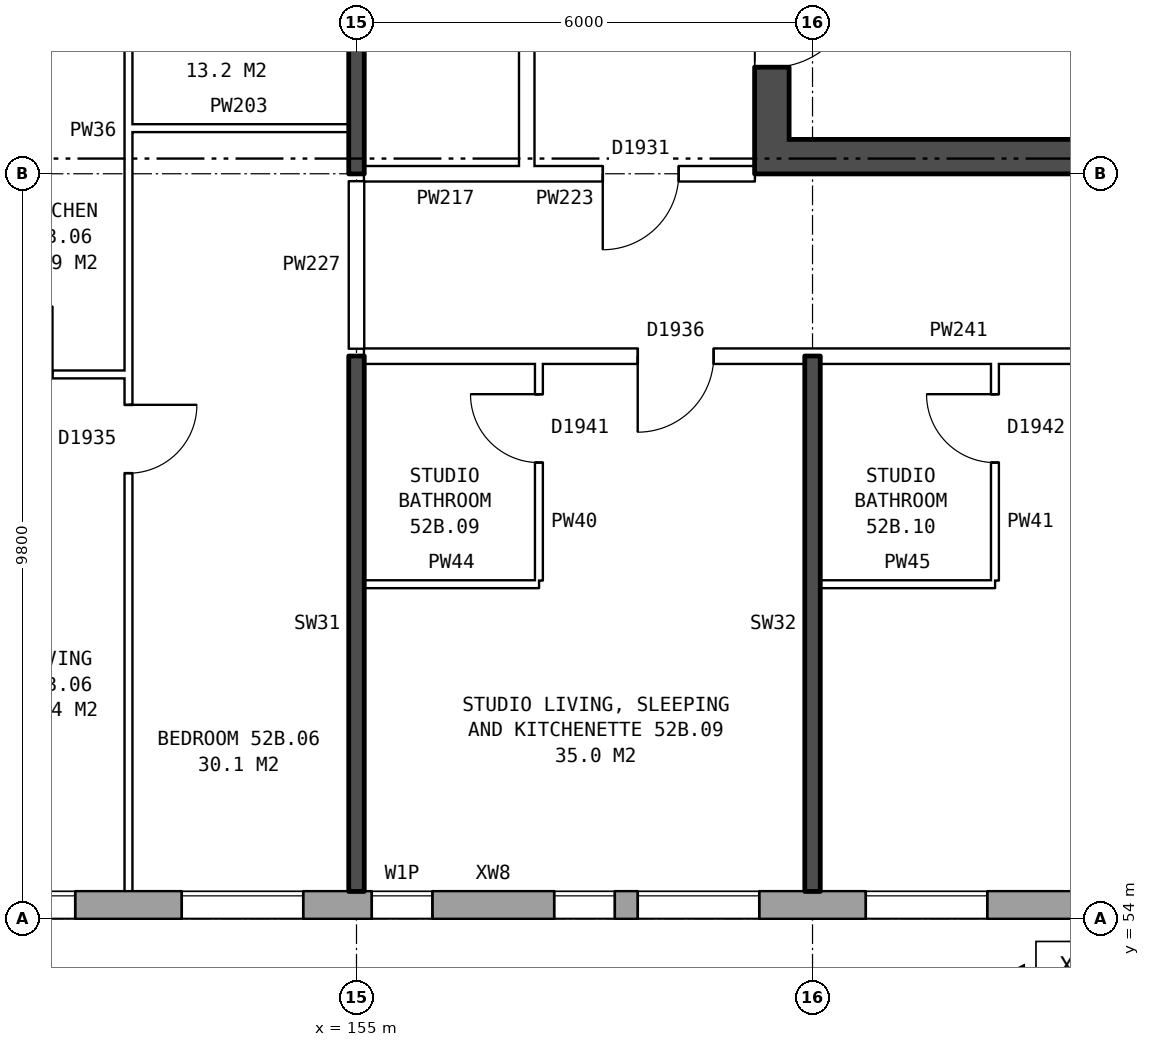
"""IFC4 building model, lengths in metres.
Left out: names, types, materials, properties, quantities, classifications, styles, units other than length and angle.
Written with IfcOpenShell. Run it as: python <this file> out.ifc"""

import sys

from ifc_helpers import new_model, si_unit, direction, frame, frame_2d, origin, place, context, subcontext, project, spatial, rectangle, extrude, element, fill, save


model = new_model("IFC4")
c1 = context("Model", 3, precision=1e-05, world=origin(), true_north=direction((0.0, 1.0)))
c2 = subcontext(c1, "Body", "Model", "MODEL_VIEW")
j1 = project(units=[si_unit("LENGTHUNIT", "METRE"), si_unit("PLANEANGLEUNIT", "RADIAN")], contexts=[c1])
p1 = place(None, origin())
s1 = spatial("IfcSite", under=j1, at=p1, CompositionType="ELEMENT")
p2 = place(p1, origin())
s2 = spatial("IfcBuilding", under=s1, at=p2, CompositionType="ELEMENT")
p3 = place(p2, frame((0.0, 0.0, 185.1)))
s3 = spatial("IfcBuildingStorey", under=s2, at=p3, CompositionType="ELEMENT", Elevation=185.1)
p4 = place(p3, frame((134.075, 54.18, 0.0), z_axis=(0.0, 0.0, 1.0), x_axis=(1.0, 0.0, 0.0)))
e1 = element("IfcWall", 1, at=p4, inside=s3, PredefinedType="STANDARD", context=c2, shape_type="SweptSolid", body=[
    extrude(rectangle(XDim=33.101, YDim=0.36, at=frame_2d((16.55, 0.0))), origin(), (0.0, 0.0, 1.0), 2.85),
])
p5 = place(p4, frame((0.625, 0.0, 0.8)))
e2 = element("IfcOpeningElement", 2, at=p5, cuts=e1, PredefinedType="OPENING", context=c2, shape_type="SweptSolid", body=[
    extrude(rectangle(XDim=1.6, YDim=1.8, at=frame_2d((0.8, 0.9))), frame((0.0, 0.19, 0.0), z_axis=(0.0, -1.0, 0.0), x_axis=(1.0, 0.0, 0.0)), (0.0, 0.0, 1.0), 0.38),
])
p6 = place(p4, frame((3.625, 0.0, 0.8)))
e3 = element("IfcOpeningElement", 3, at=p6, cuts=e1, PredefinedType="OPENING", context=c2, shape_type="SweptSolid", body=[
    extrude(rectangle(XDim=1.6, YDim=1.8, at=frame_2d((0.8, 0.9))), frame((0.0, 0.19, 0.0), z_axis=(0.0, -1.0, 0.0), x_axis=(1.0, 0.0, 0.0)), (0.0, 0.0, 1.0), 0.38),
])
p7 = place(p4, frame((6.625, 0.0, 0.8)))
e4 = element("IfcOpeningElement", 4, at=p7, cuts=e1, PredefinedType="OPENING", context=c2, shape_type="SweptSolid", body=[
    extrude(rectangle(XDim=1.6, YDim=1.8, at=frame_2d((0.8, 0.9))), frame((0.0, 0.19, 0.0), z_axis=(0.0, -1.0, 0.0), x_axis=(1.0, 0.0, 0.0)), (0.0, 0.0, 1.0), 0.38),
])
p8 = place(p4, frame((9.125, 0.0, 1.65)))
e5 = element("IfcOpeningElement", 5, at=p8, cuts=e1, PredefinedType="OPENING", context=c2, shape_type="SweptSolid", body=[
    extrude(rectangle(XDim=0.6, YDim=0.9, at=frame_2d((0.3, 0.45))), frame((0.0, 0.19, 0.0), z_axis=(0.0, -1.0, 0.0), x_axis=(1.0, 0.0, 0.0)), (0.0, 0.0, 1.0), 0.38),
])
p9 = place(p4, frame((12.625, 0.0, 0.8)))
e6 = element("IfcOpeningElement", 6, at=p9, cuts=e1, PredefinedType="OPENING", context=c2, shape_type="SweptSolid", body=[
    extrude(rectangle(XDim=1.6, YDim=1.8, at=frame_2d((0.8, 0.9))), frame((0.0, 0.19, 0.0), z_axis=(0.0, -1.0, 0.0), x_axis=(1.0, 0.0, 0.0)), (0.0, 0.0, 1.0), 0.38),
])
p10 = place(p4, frame((15.625, 0.0, 0.8)))
e7 = element("IfcOpeningElement", 7, at=p10, cuts=e1, PredefinedType="OPENING", context=c2, shape_type="SweptSolid", body=[
    extrude(rectangle(XDim=1.6, YDim=1.8, at=frame_2d((0.8, 0.9))), frame((0.0, 0.19, 0.0), z_axis=(0.0, -1.0, 0.0), x_axis=(1.0, 0.0, 0.0)), (0.0, 0.0, 1.0), 0.38),
])
p11 = place(p4, frame((18.625, 0.0, 0.8)))
e8 = element("IfcOpeningElement", 8, at=p11, cuts=e1, PredefinedType="OPENING", context=c2, shape_type="SweptSolid", body=[
    extrude(rectangle(XDim=1.6, YDim=1.8, at=frame_2d((0.8, 0.9))), frame((0.0, 0.19, 0.0), z_axis=(0.0, -1.0, 0.0), x_axis=(1.0, 0.0, 0.0)), (0.0, 0.0, 1.0), 0.38),
])
p12 = place(p4, frame((21.125, 0.0, 0.8)))
e9 = element("IfcOpeningElement", 9, at=p12, cuts=e1, PredefinedType="OPENING", context=c2, shape_type="SweptSolid", body=[
    extrude(rectangle(XDim=0.8, YDim=1.2, at=frame_2d((0.4, 0.6))), frame((0.0, 0.19, 0.0), z_axis=(0.0, -1.0, 0.0), x_axis=(1.0, 0.0, 0.0)), (0.0, 0.0, 1.0), 0.38),
])
p13 = place(p4, frame((24.625, 0.0, 0.8)))
e10 = element("IfcOpeningElement", 10, at=p13, cuts=e1, PredefinedType="OPENING", context=c2, shape_type="SweptSolid", body=[
    extrude(rectangle(XDim=1.6, YDim=1.8, at=frame_2d((0.8, 0.9))), frame((0.0, 0.19, 0.0), z_axis=(0.0, -1.0, 0.0), x_axis=(1.0, 0.0, 0.0)), (0.0, 0.0, 1.0), 0.38),
])
p14 = place(p4, frame((27.625, 0.0, 0.8)))
e11 = element("IfcOpeningElement", 11, at=p14, cuts=e1, PredefinedType="OPENING", context=c2, shape_type="SweptSolid", body=[
    extrude(rectangle(XDim=1.6, YDim=1.8, at=frame_2d((0.8, 0.9))), frame((0.0, 0.19, 0.0), z_axis=(0.0, -1.0, 0.0), x_axis=(1.0, 0.0, 0.0)), (0.0, 0.0, 1.0), 0.38),
])
p15 = place(p4, frame((30.625, 0.0, 0.8)))
e12 = element("IfcOpeningElement", 12, at=p15, cuts=e1, PredefinedType="OPENING", context=c2, shape_type="SweptSolid", body=[
    extrude(rectangle(XDim=1.6, YDim=1.8, at=frame_2d((0.8, 0.9))), frame((0.0, 0.19, 0.0), z_axis=(0.0, -1.0, 0.0), x_axis=(1.0, 0.0, 0.0)), (0.0, 0.0, 1.0), 0.38),
])
p16 = place(p4, frame((10.725, 0.0, 0.35)))
e13 = element("IfcOpeningElement", 13, at=p16, cuts=e1, PredefinedType="OPENING", context=c2, shape_type="SweptSolid", body=[
    extrude(rectangle(XDim=1.0, YDim=1.2, at=frame_2d((0.5, 0.6))), frame((0.0, 0.19, 0.0), z_axis=(0.0, -1.0, 0.0), x_axis=(1.0, 0.0, 0.0)), (0.0, 0.0, 1.0), 0.38),
])
p17 = place(p4, frame((23.525, 0.0, 1.4)))
e14 = element("IfcOpeningElement", 14, at=p17, cuts=e1, PredefinedType="OPENING", context=c2, shape_type="SweptSolid", body=[
    extrude(rectangle(XDim=0.8, YDim=1.2, at=frame_2d((0.4, 0.6))), frame((0.0, 0.19, 0.0), z_axis=(0.0, -1.0, 0.0), x_axis=(1.0, 0.0, 0.0)), (0.0, 0.0, 1.0), 0.38),
])
p18 = place(p3, frame((160.465, 76.2, 0.0), z_axis=(0.0, 0.0, 1.0), x_axis=(0.0, -1.0, 0.0)))
e15 = element("IfcWall", 15, at=p18, inside=s3, PredefinedType="SHEAR", context=c2, shape_type="SweptSolid", body=[
    extrude(rectangle(XDim=12.4, YDim=0.45, at=frame_2d((6.2, 0.0))), origin(), (0.0, 0.0, 1.0), 2.85),
])
p19 = place(p18, frame((1.325, 0.0, 0.0)))
e16 = element("IfcOpeningElement", 16, at=p19, cuts=e15, PredefinedType="OPENING", context=c2, shape_type="SweptSolid", body=[
    extrude(rectangle(XDim=1.1, YDim=2.1, at=frame_2d((0.55, 1.05))), frame((0.0, 0.235, 0.0), z_axis=(0.0, -1.0, 0.0), x_axis=(1.0, 0.0, 0.0)), (0.0, 0.0, 1.0), 0.47),
])
p20 = place(p18, frame((3.825, 0.0, 0.0)))
e17 = element("IfcOpeningElement", 17, at=p20, cuts=e15, PredefinedType="OPENING", context=c2, shape_type="SweptSolid", body=[
    extrude(rectangle(XDim=0.85, YDim=2.1, at=frame_2d((0.425, 1.05))), frame((0.0, 0.235, 0.0), z_axis=(0.0, -1.0, 0.0), x_axis=(1.0, 0.0, 0.0)), (0.0, 0.0, 1.0), 0.47),
])
p21 = place(p18, frame((5.975, 0.0, 0.0)))
e18 = element("IfcOpeningElement", 18, at=p21, cuts=e15, PredefinedType="OPENING", context=c2, shape_type="SweptSolid", body=[
    extrude(rectangle(XDim=0.85, YDim=2.1, at=frame_2d((0.425, 1.05))), frame((0.0, 0.235, 0.0), z_axis=(0.0, -1.0, 0.0), x_axis=(1.0, 0.0, 0.0)), (0.0, 0.0, 1.0), 0.47),
])
p22 = place(p18, frame((9.9, 0.0, 0.0)))
e19 = element("IfcOpeningElement", 19, at=p22, cuts=e15, PredefinedType="OPENING", context=c2, shape_type="SweptSolid", body=[
    extrude(rectangle(XDim=1.1, YDim=2.1, at=frame_2d((0.55, 1.05))), frame((0.0, 0.235, 0.0), z_axis=(0.0, -1.0, 0.0), x_axis=(1.0, 0.0, 0.0)), (0.0, 0.0, 1.0), 0.47),
])
p23 = place(p18, frame((8.125, 0.0, 0.0)))
e20 = element("IfcOpeningElement", 20, at=p23, cuts=e15, PredefinedType="OPENING", context=c2, shape_type="SweptSolid", body=[
    extrude(rectangle(XDim=0.85, YDim=2.1, at=frame_2d((0.425, 1.05))), frame((0.0, 0.235, 0.0), z_axis=(0.0, -1.0, 0.0), x_axis=(1.0, 0.0, 0.0)), (0.0, 0.0, 1.0), 0.47),
])
p24 = place(p3, frame((160.69, 64.025, 0.0), z_axis=(0.0, 0.0, 1.0), x_axis=(1.0, 0.0, 0.0)))
e21 = element("IfcWall", 21, at=p24, inside=s3, PredefinedType="SHEAR", context=c2, shape_type="SweptSolid", body=[
    extrude(rectangle(XDim=7.5, YDim=0.45, at=frame_2d((3.75, 0.0))), origin(), (0.0, 0.0, 1.0), 2.85),
])
p25 = place(p3, frame((157.24, 63.9, 0.0), z_axis=(0.0, 0.0, 1.0), x_axis=(0.0, 1.0, 0.0)))
e22 = element("IfcWall", 22, at=p25, inside=s3, PredefinedType="PARTITIONING", context=c2, shape_type="SweptSolid", body=[
    extrude(rectangle(XDim=12.2, YDim=0.2, at=frame_2d((6.1, 0.0))), origin(), (0.0, 0.0, 1.0), 2.85),
])
p26 = place(p25, frame((5.1, 0.0, 0.0)))
e23 = element("IfcOpeningElement", 23, at=p26, cuts=e22, PredefinedType="OPENING", context=c2, shape_type="SweptSolid", body=[
    extrude(rectangle(XDim=2.0, YDim=2.1, at=frame_2d((1.0, 1.05))), frame((0.0, 0.11, 0.0), z_axis=(0.0, -1.0, 0.0), x_axis=(1.0, 0.0, 0.0)), (0.0, 0.0, 1.0), 0.22),
])
for number, where, z_axis, x_axis in (
    (24, (155.1, 58.4, 0.0), (0.0, 0.0, 1.0), (1.0, 0.0, 0.0)),
    (25, (161.1, 58.4, 0.0), (0.0, 0.0, 1.0), (1.0, 0.0, 0.0)),
):
    element("IfcWall", number, at=place(p3, frame(where, z_axis=z_axis, x_axis=x_axis)), inside=s3, PredefinedType="PARTITIONING", context=c2, shape_type="SweptSolid", body=[
        extrude(rectangle(XDim=2.3, YDim=0.1, at=frame_2d((1.15, 0.0))), origin(), (0.0, 0.0, 1.0), 2.85),
    ])
p27 = place(p3, frame((149.1, 61.16, 0.0), z_axis=(0.0, 0.0, 1.0), x_axis=(1.0, 0.0, 0.0)))
e26 = element("IfcWall", 26, at=p27, inside=s3, PredefinedType="PARTITIONING", context=c2, shape_type="SweptSolid", body=[
    extrude(rectangle(XDim=2.9, YDim=0.1, at=frame_2d((1.45, 0.0))), origin(), (0.0, 0.0, 1.0), 2.85),
])
p28 = place(p27, frame((1.0, 0.0, 0.0)))
e27 = element("IfcOpeningElement", 27, at=p28, cuts=e26, PredefinedType="OPENING", context=c2, shape_type="SweptSolid", body=[
    extrude(rectangle(XDim=0.9, YDim=2.1, at=frame_2d((0.45, 1.05))), frame((0.0, 0.06, 0.0), z_axis=(0.0, -1.0, 0.0), x_axis=(1.0, 0.0, 0.0)), (0.0, 0.0, 1.0), 0.12),
])
p29 = place(p3, frame((155.1, 61.4, 0.0), z_axis=(0.0, 0.0, 1.0), x_axis=(1.0, 0.0, 0.0)))
e28 = element("IfcWall", 28, at=p29, inside=s3, PredefinedType="PARTITIONING", context=c2, shape_type="SweptSolid", body=[
    extrude(rectangle(XDim=14.79, YDim=0.2, at=frame_2d((7.395, 0.0))), origin(), (0.0, 0.0, 1.0), 2.85),
])
p30 = place(p29, frame((3.6, 0.0, 0.0)))
e29 = element("IfcOpeningElement", 29, at=p30, cuts=e28, PredefinedType="OPENING", context=c2, shape_type="SweptSolid", body=[
    extrude(rectangle(XDim=1.0, YDim=2.1, at=frame_2d((0.5, 1.05))), frame((0.0, 0.11, 0.0), z_axis=(0.0, -1.0, 0.0), x_axis=(1.0, 0.0, 0.0)), (0.0, 0.0, 1.0), 0.22),
])
p31 = place(p29, frame((11.045, 0.0, 0.0)))
e30 = element("IfcOpeningElement", 30, at=p31, cuts=e28, PredefinedType="OPENING", context=c2, shape_type="SweptSolid", body=[
    extrude(rectangle(XDim=1.0, YDim=2.1, at=frame_2d((0.5, 1.05))), frame((0.0, 0.11, 0.0), z_axis=(0.0, -1.0, 0.0), x_axis=(1.0, 0.0, 0.0)), (0.0, 0.0, 1.0), 0.22),
])
p32 = place(p3, frame((155.1, 63.8, 0.0), z_axis=(0.0, 0.0, 1.0), x_axis=(1.0, 0.0, 0.0)))
e31 = element("IfcWall", 31, at=p32, inside=s3, PredefinedType="PARTITIONING", context=c2, shape_type="SweptSolid", body=[
    extrude(rectangle(XDim=2.14, YDim=0.2, at=frame_2d((1.07, 0.0))), origin(), (0.0, 0.0, 1.0), 2.85),
])
p33 = place(p3, frame((157.24, 63.8, 0.0), z_axis=(0.0, 0.0, 1.0), x_axis=(1.0, 0.0, 0.0)))
e32 = element("IfcWall", 32, at=p33, inside=s3, PredefinedType="PARTITIONING", context=c2, shape_type="SweptSolid", body=[
    extrude(rectangle(XDim=3.0, YDim=0.2, at=frame_2d((1.5, 0.0))), origin(), (0.0, 0.0, 1.0), 2.85),
])
p34 = place(p33, frame((1.0, 0.0, 0.0)))
e33 = element("IfcOpeningElement", 33, at=p34, cuts=e32, PredefinedType="OPENING", context=c2, shape_type="SweptSolid", body=[
    extrude(rectangle(XDim=1.0, YDim=2.1, at=frame_2d((0.5, 1.05))), frame((0.0, 0.11, 0.0), z_axis=(0.0, -1.0, 0.0), x_axis=(1.0, 0.0, 0.0)), (0.0, 0.0, 1.0), 0.22),
])
p35 = place(p3, frame((152.0, 64.4, 0.0), z_axis=(0.0, 0.0, 1.0), x_axis=(1.0, 0.0, 0.0)))
e34 = element("IfcWall", 34, at=p35, inside=s3, PredefinedType="PARTITIONING", context=c2, shape_type="SweptSolid", body=[
    extrude(rectangle(XDim=2.9, YDim=0.1, at=frame_2d((1.45, 0.0))), origin(), (0.0, 0.0, 1.0), 2.85),
])
p36 = place(p3, frame((152.0, 54.36, 0.0), z_axis=(0.0, 0.0, 1.0), x_axis=(0.0, 1.0, 0.0)))
e35 = element("IfcWall", 35, at=p36, inside=s3, PredefinedType="PARTITIONING", context=c2, shape_type="SweptSolid", body=[
    extrude(rectangle(XDim=14.34, YDim=0.1, at=frame_2d((7.17, 0.0))), origin(), (0.0, 0.0, 1.0), 2.85),
])
p37 = place(p36, frame((5.5, 0.0, 0.0)))
e36 = element("IfcOpeningElement", 36, at=p37, cuts=e35, PredefinedType="OPENING", context=c2, shape_type="SweptSolid", body=[
    extrude(rectangle(XDim=0.9, YDim=2.1, at=frame_2d((0.45, 1.05))), frame((0.0, 0.06, 0.0), z_axis=(0.0, -1.0, 0.0), x_axis=(1.0, 0.0, 0.0)), (0.0, 0.0, 1.0), 0.12),
])
p38 = place(p36, frame((13.04, 0.0, 0.0)))
e37 = element("IfcOpeningElement", 37, at=p38, cuts=e35, PredefinedType="OPENING", context=c2, shape_type="SweptSolid", body=[
    extrude(rectangle(XDim=0.9, YDim=2.1, at=frame_2d((0.45, 1.05))), frame((0.0, 0.06, 0.0), z_axis=(0.0, -1.0, 0.0), x_axis=(1.0, 0.0, 0.0)), (0.0, 0.0, 1.0), 0.12),
])
p39 = place(p3, frame((155.0, 54.36, 0.0), z_axis=(0.0, 0.0, 1.0), x_axis=(0.0, 1.0, 0.0)))
e38 = element("IfcWall", 38, at=p39, inside=s3, PredefinedType="SOLIDWALL", context=c2, shape_type="SweptSolid", body=[
    extrude(rectangle(XDim=7.04, YDim=0.2, at=frame_2d((3.52, 0.0))), origin(), (0.0, 0.0, 1.0), 2.85),
])
p40 = place(p3, frame((155.0, 61.5, 0.0), z_axis=(0.0, 0.0, 1.0), x_axis=(0.0, 1.0, 0.0)))
e39 = element("IfcWall", 39, at=p40, inside=s3, PredefinedType="PARTITIONING", context=c2, shape_type="SweptSolid", body=[
    extrude(rectangle(XDim=2.2, YDim=0.2, at=frame_2d((1.1, 0.0))), origin(), (0.0, 0.0, 1.0), 2.85),
])
p41 = place(p3, frame((155.0, 63.8, 0.0), z_axis=(0.0, 0.0, 1.0), x_axis=(0.0, 1.0, 0.0)))
e40 = element("IfcWall", 40, at=p41, inside=s3, PredefinedType="SOLIDWALL", context=c2, shape_type="SweptSolid", body=[
    extrude(rectangle(XDim=5.0, YDim=0.2, at=frame_2d((2.5, 0.0))), origin(), (0.0, 0.0, 1.0), 2.85),
])
p42 = place(p3, frame((157.4, 58.45, 0.0), z_axis=(0.0, 0.0, 1.0), x_axis=(0.0, 1.0, 0.0)))
e41 = element("IfcWall", 41, at=p42, inside=s3, PredefinedType="PARTITIONING", context=c2, shape_type="SweptSolid", body=[
    extrude(rectangle(XDim=2.85, YDim=0.1, at=frame_2d((1.425, 0.0))), origin(), (0.0, 0.0, 1.0), 2.85),
])
p43 = place(p42, frame((1.55, 0.0, 0.0)))
e42 = element("IfcOpeningElement", 42, at=p43, cuts=e41, PredefinedType="OPENING", context=c2, shape_type="SweptSolid", body=[
    extrude(rectangle(XDim=0.9, YDim=2.1, at=frame_2d((0.45, 1.05))), frame((0.0, 0.06, 0.0), z_axis=(0.0, -1.0, 0.0), x_axis=(1.0, 0.0, 0.0)), (0.0, 0.0, 1.0), 0.12),
])
p44 = place(p3, frame((161.0, 54.36, 0.0), z_axis=(0.0, 0.0, 1.0), x_axis=(0.0, 1.0, 0.0)))
e43 = element("IfcWall", 43, at=p44, inside=s3, PredefinedType="SOLIDWALL", context=c2, shape_type="SweptSolid", body=[
    extrude(rectangle(XDim=7.04, YDim=0.2, at=frame_2d((3.52, 0.0))), origin(), (0.0, 0.0, 1.0), 2.85),
])
p45 = place(p3, frame((163.4, 58.45, 0.0), z_axis=(0.0, 0.0, 1.0), x_axis=(0.0, 1.0, 0.0)))
e44 = element("IfcWall", 44, at=p45, inside=s3, PredefinedType="PARTITIONING", context=c2, shape_type="SweptSolid", body=[
    extrude(rectangle(XDim=2.85, YDim=0.1, at=frame_2d((1.425, 0.0))), origin(), (0.0, 0.0, 1.0), 2.85),
])
p46 = place(p45, frame((1.55, 0.0, 0.0)))
e45 = element("IfcOpeningElement", 45, at=p46, cuts=e44, PredefinedType="OPENING", context=c2, shape_type="SweptSolid", body=[
    extrude(rectangle(XDim=0.9, YDim=2.1, at=frame_2d((0.45, 1.05))), frame((0.0, 0.06, 0.0), z_axis=(0.0, -1.0, 0.0), x_axis=(1.0, 0.0, 0.0)), (0.0, 0.0, 1.0), 0.12),
])
p47 = place(p10, origin())
e46 = element("IfcWindow", 46, at=p47, inside=s3, PartitioningType="SINGLE_PANEL", PredefinedType="WINDOW", context=c2, shape_type="SweptSolid", body=[
    extrude(rectangle(XDim=1.6, YDim=1.8, at=frame_2d((0.8, 0.9))), frame((0.0, 0.15, 0.0), z_axis=(0.0, -1.0, 0.0), x_axis=(1.0, 0.0, 0.0)), (0.0, 0.0, 1.0), 0.06),
])
fill(e7, e46)
p48 = place(p11, origin())
e47 = element("IfcWindow", 47, at=p48, inside=s3, PartitioningType="SINGLE_PANEL", PredefinedType="WINDOW", context=c2, shape_type="SweptSolid", body=[
    extrude(rectangle(XDim=1.6, YDim=1.8, at=frame_2d((0.8, 0.9))), frame((0.0, 0.15, 0.0), z_axis=(0.0, -1.0, 0.0), x_axis=(1.0, 0.0, 0.0)), (0.0, 0.0, 1.0), 0.06),
])
fill(e8, e47)
p49 = place(p12, origin())
e48 = element("IfcWindow", 48, at=p49, inside=s3, PartitioningType="SINGLE_PANEL", PredefinedType="WINDOW", context=c2, shape_type="SweptSolid", body=[
    extrude(rectangle(XDim=0.8, YDim=1.2, at=frame_2d((0.4, 0.6))), frame((0.0, 0.15, 0.0), z_axis=(0.0, -1.0, 0.0), x_axis=(1.0, 0.0, 0.0)), (0.0, 0.0, 1.0), 0.06),
])
fill(e9, e48)
p50 = place(p13, origin())
e49 = element("IfcWindow", 49, at=p50, inside=s3, PartitioningType="SINGLE_PANEL", PredefinedType="WINDOW", context=c2, shape_type="SweptSolid", body=[
    extrude(rectangle(XDim=1.6, YDim=1.8, at=frame_2d((0.8, 0.9))), frame((0.0, 0.15, 0.0), z_axis=(0.0, -1.0, 0.0), x_axis=(1.0, 0.0, 0.0)), (0.0, 0.0, 1.0), 0.06),
])
fill(e10, e49)
p51 = place(p14, origin())
e50 = element("IfcWindow", 50, at=p51, inside=s3, PartitioningType="SINGLE_PANEL", PredefinedType="WINDOW", context=c2, shape_type="SweptSolid", body=[
    extrude(rectangle(XDim=1.6, YDim=1.8, at=frame_2d((0.8, 0.9))), frame((0.0, 0.15, 0.0), z_axis=(0.0, -1.0, 0.0), x_axis=(1.0, 0.0, 0.0)), (0.0, 0.0, 1.0), 0.06),
])
fill(e11, e50)
p52 = place(p22, origin())
e51 = element("IfcDoor", 51, at=p52, inside=s3, OperationType="SINGLE_SWING_LEFT", PredefinedType="DOOR", context=c2, shape_type="SweptSolid", body=[
    extrude(rectangle(XDim=1.1, YDim=2.1, at=frame_2d((0.55, 1.05))), frame((0.0, 0.21, 0.0), z_axis=(0.0, -1.0, 0.0), x_axis=(1.0, 0.0, 0.0)), (0.0, 0.0, 1.0), 0.05),
])
fill(e19, e51)
p53 = place(p34, frame((1.0, 0.0, 0.0), z_axis=(0.0, 0.0, 1.0), x_axis=(-1.0, 0.0, 0.0)))
e52 = element("IfcDoor", 52, at=p53, inside=s3, OperationType="SINGLE_SWING_RIGHT", PredefinedType="DOOR", context=c2, shape_type="SweptSolid", body=[
    extrude(rectangle(XDim=1.0, YDim=2.1, at=frame_2d((0.5, 1.05))), frame((0.0, 0.025, 0.0), z_axis=(0.0, -1.0, 0.0), x_axis=(1.0, 0.0, 0.0)), (0.0, 0.0, 1.0), 0.05),
])
fill(e33, e52)
p54 = place(p37, frame((0.9, 0.0, 0.0), z_axis=(0.0, 0.0, 1.0), x_axis=(-1.0, 0.0, 0.0)))
e53 = element("IfcDoor", 53, at=p54, inside=s3, OperationType="SINGLE_SWING_LEFT", PredefinedType="DOOR", context=c2, shape_type="SweptSolid", body=[
    extrude(rectangle(XDim=0.9, YDim=2.1, at=frame_2d((0.45, 1.05))), frame((0.0, 0.025, 0.0), z_axis=(0.0, -1.0, 0.0), x_axis=(1.0, 0.0, 0.0)), (0.0, 0.0, 1.0), 0.05),
])
fill(e36, e53)
p55 = place(p30, frame((1.0, 0.0, 0.0), z_axis=(0.0, 0.0, 1.0), x_axis=(-1.0, 0.0, 0.0)))
e54 = element("IfcDoor", 54, at=p55, inside=s3, OperationType="SINGLE_SWING_RIGHT", PredefinedType="DOOR", context=c2, shape_type="SweptSolid", body=[
    extrude(rectangle(XDim=1.0, YDim=2.1, at=frame_2d((0.5, 1.05))), frame((0.0, 0.025, 0.0), z_axis=(0.0, -1.0, 0.0), x_axis=(1.0, 0.0, 0.0)), (0.0, 0.0, 1.0), 0.05),
])
fill(e29, e54)
p56 = place(p43, origin())
e55 = element("IfcDoor", 55, at=p56, inside=s3, OperationType="SINGLE_SWING_RIGHT", PredefinedType="DOOR", context=c2, shape_type="SweptSolid", body=[
    extrude(rectangle(XDim=0.9, YDim=2.1, at=frame_2d((0.45, 1.05))), frame((0.0, 0.025, 0.0), z_axis=(0.0, -1.0, 0.0), x_axis=(1.0, 0.0, 0.0)), (0.0, 0.0, 1.0), 0.05),
])
fill(e42, e55)
p57 = place(p46, origin())
e56 = element("IfcDoor", 56, at=p57, inside=s3, OperationType="SINGLE_SWING_RIGHT", PredefinedType="DOOR", context=c2, shape_type="SweptSolid", body=[
    extrude(rectangle(XDim=0.9, YDim=2.1, at=frame_2d((0.45, 1.05))), frame((0.0, 0.025, 0.0), z_axis=(0.0, -1.0, 0.0), x_axis=(1.0, 0.0, 0.0)), (0.0, 0.0, 1.0), 0.05),
])
fill(e45, e56)
p58 = place(p17, origin())
e57 = element("IfcWindow", 57, at=p58, inside=s3, PartitioningType="SINGLE_PANEL", PredefinedType="WINDOW", context=c2, shape_type="SweptSolid", body=[
    extrude(rectangle(XDim=0.8, YDim=1.2, at=frame_2d((0.4, 0.6))), frame((0.0, 0.15, 0.0), z_axis=(0.0, -1.0, 0.0), x_axis=(1.0, 0.0, 0.0)), (0.0, 0.0, 1.0), 0.06),
])
fill(e14, e57)
save(model, sys.argv[1])
